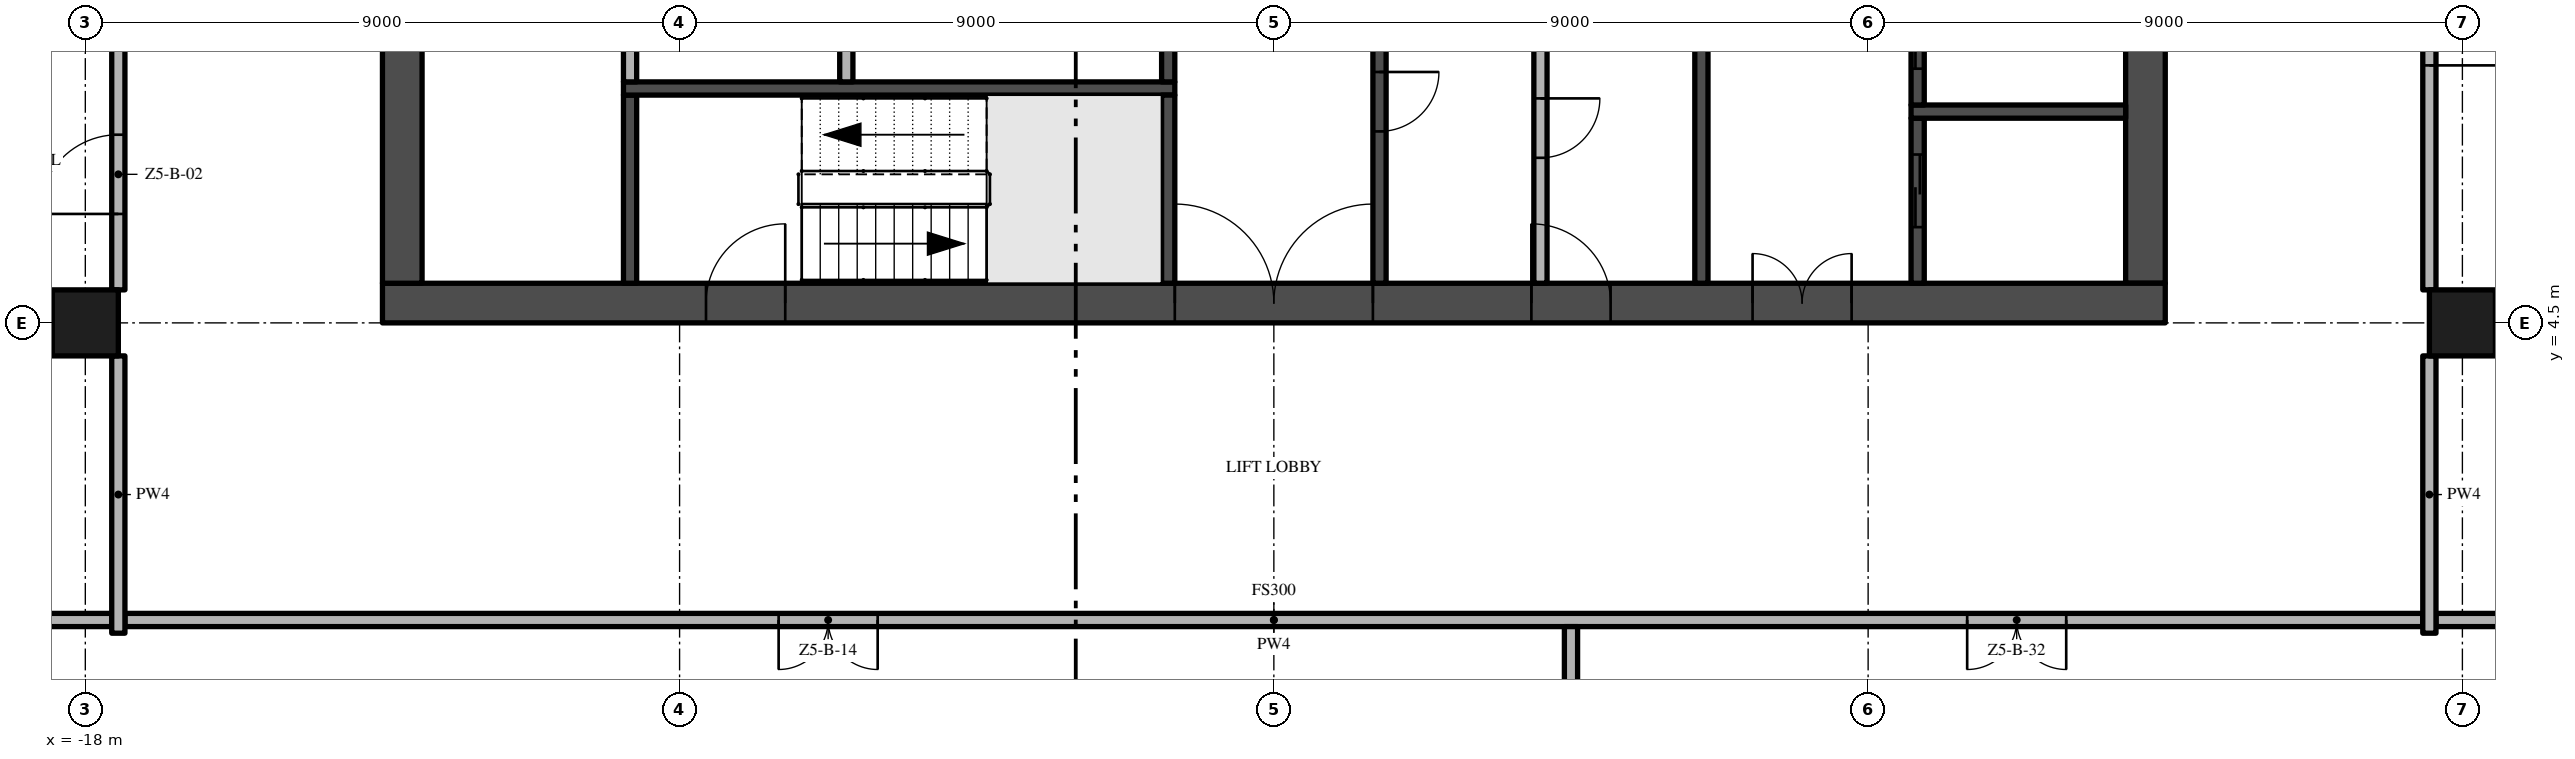
"""IFC4 building model, lengths in metres.
Left out: names, types, materials, properties, quantities, classifications, styles, units other than length and angle.
Written with IfcOpenShell. Run it as: python <this file> out.ifc"""

import sys

from ifc_helpers import new_model, si_unit, direction, frame, frame_2d, origin, origin_2d, place, context, subcontext, project, spatial, rectangle, extrude, element, fill, save


model = new_model("IFC4")
c1 = context("Model", 3, precision=1e-05, world=origin(), true_north=direction((0.0, 1.0)))
c2 = subcontext(c1, "Body", "Model", "MODEL_VIEW")
j1 = project(units=[si_unit("LENGTHUNIT", "METRE"), si_unit("PLANEANGLEUNIT", "RADIAN")], contexts=[c1])
p1 = place(None, origin())
s1 = spatial("IfcSite", under=j1, at=p1, CompositionType="ELEMENT")
p2 = place(p1, origin())
s2 = spatial("IfcBuilding", under=s1, at=p2, CompositionType="ELEMENT")
p3 = place(p2, frame((0.0, 0.0, 250.2)))
s3 = spatial("IfcBuildingStorey", under=s2, at=p3, CompositionType="ELEMENT", Elevation=250.2)
p4 = place(p3, frame((-13.5, 4.8, -0.3), z_axis=(0.0, 0.0, 1.0), x_axis=(1.0, 0.0, 0.0)))
e1 = element("IfcWall", 1, at=p4, inside=s3, PredefinedType="SHEAR", context=c2, shape_type="SweptSolid", body=[
    extrude(rectangle(XDim=27.0, YDim=0.6, at=frame_2d((13.5, 0.0))), origin(), (0.0, 0.0, 1.0), 3.8),
])
p5 = place(p4, frame((12.0, 0.0, 0.3)))
e2 = element("IfcOpeningElement", 2, at=p5, cuts=e1, PredefinedType="OPENING", context=c2, shape_type="SweptSolid", body=[
    extrude(rectangle(XDim=3.0, YDim=2.4, at=frame_2d((1.5, 1.2))), frame((0.0, 0.31, 0.0), z_axis=(0.0, -1.0, 0.0), x_axis=(1.0, 0.0, 0.0)), (0.0, 0.0, 1.0), 0.62),
])
p6 = place(p4, frame((4.9, 0.0, 0.3)))
e3 = element("IfcOpeningElement", 3, at=p6, cuts=e1, PredefinedType="OPENING", context=c2, shape_type="SweptSolid", body=[
    extrude(rectangle(XDim=1.2, YDim=2.2, at=frame_2d((0.6, 1.1))), frame((0.0, 0.31, 0.0), z_axis=(0.0, -1.0, 0.0), x_axis=(1.0, 0.0, 0.0)), (0.0, 0.0, 1.0), 0.62),
])
p7 = place(p4, frame((20.75, 0.0, 0.3)))
e4 = element("IfcOpeningElement", 4, at=p7, cuts=e1, PredefinedType="OPENING", context=c2, shape_type="SweptSolid", body=[
    extrude(rectangle(XDim=1.5, YDim=2.2, at=frame_2d((0.75, 1.1))), frame((0.0, 0.31, 0.0), z_axis=(0.0, -1.0, 0.0), x_axis=(1.0, 0.0, 0.0)), (0.0, 0.0, 1.0), 0.62),
])
p8 = place(p4, frame((17.4, 0.0, 0.3)))
e5 = element("IfcOpeningElement", 5, at=p8, cuts=e1, PredefinedType="OPENING", context=c2, shape_type="SweptSolid", body=[
    extrude(rectangle(XDim=1.2, YDim=2.2, at=frame_2d((0.6, 1.1))), frame((0.0, 0.31, 0.0), z_axis=(0.0, -1.0, 0.0), x_axis=(1.0, 0.0, 0.0)), (0.0, 0.0, 1.0), 0.62),
])
p9 = place(p3, frame((13.2, 5.1, -0.3), z_axis=(0.0, 0.0, 1.0), x_axis=(0.0, 1.0, 0.0)))
e6 = element("IfcWall", 6, at=p9, inside=s3, PredefinedType="SHEAR", context=c2, shape_type="SweptSolid", body=[
    extrude(rectangle(XDim=16.8, YDim=0.6, at=frame_2d((8.4, 0.0))), origin(), (0.0, 0.0, 1.0), 3.8),
])
p10 = place(p9, frame((6.3, 0.0, 0.3)))
e7 = element("IfcOpeningElement", 7, at=p10, cuts=e6, PredefinedType="OPENING", context=c2, shape_type="SweptSolid", body=[
    extrude(rectangle(XDim=1.2, YDim=2.2, at=frame_2d((0.6, 1.1))), frame((0.0, 0.31, 0.0), z_axis=(0.0, -1.0, 0.0), x_axis=(1.0, 0.0, 0.0)), (0.0, 0.0, 1.0), 0.62),
])
p11 = place(p3, frame((-13.2, 21.9, -0.3), z_axis=(0.0, 0.0, 1.0), x_axis=(0.0, -1.0, 0.0)))
e8 = element("IfcWall", 8, at=p11, inside=s3, PredefinedType="SHEAR", context=c2, shape_type="SweptSolid", body=[
    extrude(rectangle(XDim=16.8, YDim=0.6, at=frame_2d((8.4, 0.0))), origin(), (0.0, 0.0, 1.0), 3.8),
])
p12 = place(p11, frame((9.3, 0.0, 0.3)))
e9 = element("IfcOpeningElement", 9, at=p12, cuts=e8, PredefinedType="OPENING", context=c2, shape_type="SweptSolid", body=[
    extrude(rectangle(XDim=1.2, YDim=2.2, at=frame_2d((0.6, 1.1))), frame((0.0, 0.31, 0.0), z_axis=(0.0, -1.0, 0.0), x_axis=(1.0, 0.0, 0.0)), (0.0, 0.0, 1.0), 0.62),
])
for number, where, z_axis, x_axis in (
    (10, (-18.0, 4.5, 0.0), (0.0, 0.0, 1.0), (1.0, 0.0, 0.0)),
    (11, (18.0, 4.5, 0.0), (0.0, 0.0, 1.0), (1.0, 0.0, 0.0)),
):
    element("IfcColumn", number, at=place(p3, frame(where, z_axis=z_axis, x_axis=x_axis)), inside=s3, PredefinedType="COLUMN", context=c2, shape_type="SweptSolid", body=[
        extrude(rectangle(XDim=1.0, YDim=1.0, at=origin_2d()), origin(), (0.0, 0.0, 1.0), 3.5),
    ])
p13 = place(p3, frame((-9.75, 5.1, 0.0), z_axis=(0.0, 0.0, 1.0), x_axis=(0.0, 1.0, 0.0)))
e12 = element("IfcWall", 12, at=p13, inside=s3, PredefinedType="SHEAR", context=c2, shape_type="SweptSolid", body=[
    extrude(rectangle(XDim=2.85, YDim=0.2, at=frame_2d((1.425, 0.0))), origin(), (0.0, 0.0, 1.0), 3.5),
])
p14 = place(p3, frame((-9.85, 8.05, 0.0), z_axis=(0.0, 0.0, 1.0), x_axis=(1.0, 0.0, 0.0)))
e13 = element("IfcWall", 13, at=p14, inside=s3, PredefinedType="SHEAR", context=c2, shape_type="SweptSolid", body=[
    extrude(rectangle(XDim=8.35, YDim=0.2, at=frame_2d((4.175, 0.0))), origin(), (0.0, 0.0, 1.0), 3.5),
])
p15 = place(p3, frame((-9.75, 8.15, 0.0), z_axis=(0.0, 0.0, 1.0), x_axis=(0.0, 1.0, 0.0)))
e14 = element("IfcWall", 14, at=p15, inside=s3, PredefinedType="PARTITIONING", context=c2, shape_type="SweptSolid", body=[
    extrude(rectangle(XDim=1.85, YDim=0.2, at=frame_2d((0.925, 0.0))), origin(), (0.0, 0.0, 1.0), 3.5),
])
p16 = place(p15, frame((0.475, 0.0, 0.0)))
e15 = element("IfcOpeningElement", 15, at=p16, cuts=e14, PredefinedType="OPENING", context=c2, shape_type="SweptSolid", body=[
    extrude(rectangle(XDim=0.9, YDim=2.1, at=frame_2d((0.45, 1.05))), frame((0.0, 0.11, 0.0), z_axis=(0.0, -1.0, 0.0), x_axis=(1.0, 0.0, 0.0)), (0.0, 0.0, 1.0), 0.22),
])
p17 = place(p3, frame((-6.475, 8.15, 0.0), z_axis=(0.0, 0.0, 1.0), x_axis=(0.0, 1.0, 0.0)))
e16 = element("IfcWall", 16, at=p17, inside=s3, PredefinedType="PARTITIONING", context=c2, shape_type="SweptSolid", body=[
    extrude(rectangle(XDim=5.35, YDim=0.2, at=frame_2d((2.675, 0.0))), origin(), (0.0, 0.0, 1.0), 3.5),
])
p18 = place(p3, frame((-1.6, 5.1, 0.0), z_axis=(0.0, 0.0, 1.0), x_axis=(0.0, 1.0, 0.0)))
e17 = element("IfcWall", 17, at=p18, inside=s3, PredefinedType="SHEAR", context=c2, shape_type="SweptSolid", body=[
    extrude(rectangle(XDim=2.85, YDim=0.2, at=frame_2d((1.425, 0.0))), origin(), (0.0, 0.0, 1.0), 3.5),
])
p19 = place(p3, frame((-1.6, 8.15, 0.0), z_axis=(0.0, 0.0, 1.0), x_axis=(0.0, 1.0, 0.0)))
e18 = element("IfcWall", 18, at=p19, inside=s3, PredefinedType="SHEAR", context=c2, shape_type="SweptSolid", body=[
    extrude(rectangle(XDim=5.35, YDim=0.2, at=frame_2d((2.675, 0.0))), origin(), (0.0, 0.0, 1.0), 3.5),
])
p20 = place(p19, frame((2.225, 0.0, 0.0)))
e19 = element("IfcOpeningElement", 19, at=p20, cuts=e18, PredefinedType="OPENING", context=c2, shape_type="SweptSolid", body=[
    extrude(rectangle(XDim=0.9, YDim=2.1, at=frame_2d((0.45, 1.05))), frame((0.0, 0.11, 0.0), z_axis=(0.0, -1.0, 0.0), x_axis=(1.0, 0.0, 0.0)), (0.0, 0.0, 1.0), 0.22),
])
p21 = place(p3, frame((1.6, 9.8, 0.0), z_axis=(0.0, 0.0, 1.0), x_axis=(0.0, -1.0, 0.0)))
e20 = element("IfcWall", 20, at=p21, inside=s3, PredefinedType="SHEAR", context=c2, shape_type="SweptSolid", body=[
    extrude(rectangle(XDim=4.7, YDim=0.2, at=frame_2d((2.35, 0.0))), origin(), (0.0, 0.0, 1.0), 3.5),
])
p22 = place(p21, frame((1.5, 0.0, 0.0)))
e21 = element("IfcOpeningElement", 21, at=p22, cuts=e20, PredefinedType="OPENING", context=c2, shape_type="SweptSolid", body=[
    extrude(rectangle(XDim=0.9, YDim=2.1, at=frame_2d((0.45, 1.05))), frame((0.0, 0.11, 0.0), z_axis=(0.0, -1.0, 0.0), x_axis=(1.0, 0.0, 0.0)), (0.0, 0.0, 1.0), 0.22),
])
p23 = place(p3, frame((4.037, 9.8, 0.0), z_axis=(0.0, 0.0, 1.0), x_axis=(0.0, -1.0, 0.0)))
e22 = element("IfcWall", 22, at=p23, inside=s3, PredefinedType="PARTITIONING", context=c2, shape_type="SweptSolid", body=[
    extrude(rectangle(XDim=4.7, YDim=0.2, at=frame_2d((2.35, 0.0))), origin(), (0.0, 0.0, 1.0), 3.5),
])
p24 = place(p23, frame((1.9, 0.0, 0.0)))
e23 = element("IfcOpeningElement", 23, at=p24, cuts=e22, PredefinedType="OPENING", context=c2, shape_type="SweptSolid", body=[
    extrude(rectangle(XDim=0.9, YDim=2.1, at=frame_2d((0.45, 1.05))), frame((0.0, 0.11, 0.0), z_axis=(0.0, -1.0, 0.0), x_axis=(1.0, 0.0, 0.0)), (0.0, 0.0, 1.0), 0.22),
])
p25 = place(p3, frame((6.475, 5.1, 0.0), z_axis=(0.0, 0.0, 1.0), x_axis=(0.0, 1.0, 0.0)))
e24 = element("IfcWall", 24, at=p25, inside=s3, PredefinedType="SHEAR", context=c2, shape_type="SweptSolid", body=[
    extrude(rectangle(XDim=4.7, YDim=0.2, at=frame_2d((2.35, 0.0))), origin(), (0.0, 0.0, 1.0), 3.5),
])
p26 = place(p3, frame((9.75, 5.1, 0.0), z_axis=(0.0, 0.0, 1.0), x_axis=(0.0, 1.0, 0.0)))
e25 = element("IfcWall", 25, at=p26, inside=s3, PredefinedType="SHEAR", context=c2, shape_type="SweptSolid", body=[
    extrude(rectangle(XDim=2.5, YDim=0.2, at=frame_2d((1.25, 0.0))), origin(), (0.0, 0.0, 1.0), 3.5),
])
p27 = place(p26, frame((0.85, 0.0, 0.0)))
e26 = element("IfcOpeningElement", 26, at=p27, cuts=e25, PredefinedType="OPENING", context=c2, shape_type="SweptSolid", body=[
    extrude(rectangle(XDim=1.1, YDim=2.1, at=frame_2d((0.55, 1.05))), frame((0.0, 0.11, 0.0), z_axis=(0.0, -1.0, 0.0), x_axis=(1.0, 0.0, 0.0)), (0.0, 0.0, 1.0), 0.22),
])
p28 = place(p3, frame((9.65, 7.7, 0.0), z_axis=(0.0, 0.0, 1.0), x_axis=(1.0, 0.0, 0.0)))
e27 = element("IfcWall", 27, at=p28, inside=s3, PredefinedType="SHEAR", context=c2, shape_type="SweptSolid", body=[
    extrude(rectangle(XDim=3.25, YDim=0.2, at=frame_2d((1.625, 0.0))), origin(), (0.0, 0.0, 1.0), 3.5),
])
p29 = place(p3, frame((9.75, 7.8, 0.0), z_axis=(0.0, 0.0, 1.0), x_axis=(0.0, 1.0, 0.0)))
e28 = element("IfcWall", 28, at=p29, inside=s3, PredefinedType="SHEAR", context=c2, shape_type="SweptSolid", body=[
    extrude(rectangle(XDim=2.2, YDim=0.2, at=frame_2d((1.1, 0.0))), origin(), (0.0, 0.0, 1.0), 3.5),
])
p30 = place(p29, frame((0.55, 0.0, 0.0)))
e29 = element("IfcOpeningElement", 29, at=p30, cuts=e28, PredefinedType="OPENING", context=c2, shape_type="SweptSolid", body=[
    extrude(rectangle(XDim=1.1, YDim=2.1, at=frame_2d((0.55, 1.05))), frame((0.0, 0.11, 0.0), z_axis=(0.0, -1.0, 0.0), x_axis=(1.0, 0.0, 0.0)), (0.0, 0.0, 1.0), 0.22),
])
p31 = place(p3, frame((17.4, 0.0, 0.0), z_axis=(0.0, 0.0, 1.0), x_axis=(-1.0, 0.0, 0.0)))
e30 = element("IfcWall", 30, at=p31, inside=s3, PredefinedType="PARTITIONING", context=c2, shape_type="SweptSolid", body=[
    extrude(rectangle(XDim=34.8, YDim=0.2, at=frame_2d((17.4, 0.0))), origin(), (0.0, 0.0, 1.0), 3.5),
])
p32 = place(p31, frame((23.4, 0.0, 0.0)))
e31 = element("IfcOpeningElement", 31, at=p32, cuts=e30, PredefinedType="OPENING", context=c2, shape_type="SweptSolid", body=[
    extrude(rectangle(XDim=1.5, YDim=2.4, at=frame_2d((0.75, 1.2))), frame((0.0, 0.11, 0.0), z_axis=(0.0, -1.0, 0.0), x_axis=(1.0, 0.0, 0.0)), (0.0, 0.0, 1.0), 0.22),
])
p33 = place(p31, frame((5.4, 0.0, 0.0)))
e32 = element("IfcOpeningElement", 32, at=p33, cuts=e30, PredefinedType="OPENING", context=c2, shape_type="SweptSolid", body=[
    extrude(rectangle(XDim=1.5, YDim=2.4, at=frame_2d((0.75, 1.2))), frame((0.0, 0.11, 0.0), z_axis=(0.0, -1.0, 0.0), x_axis=(1.0, 0.0, 0.0)), (0.0, 0.0, 1.0), 0.22),
])
for number, where, z_axis, x_axis in (
    (33, (-26.7, 0.0, 0.0), (0.0, 0.0, 1.0), (1.0, 0.0, 0.0)),
    (34, (17.6, 0.0, 0.0), (0.0, 0.0, 1.0), (1.0, 0.0, 0.0)),
):
    element("IfcWall", number, at=place(p3, frame(where, z_axis=z_axis, x_axis=x_axis)), inside=s3, PredefinedType="PARTITIONING", context=c2, shape_type="SweptSolid", body=[
        extrude(rectangle(XDim=9.1, YDim=0.2, at=frame_2d((4.55, 0.0))), origin(), (0.0, 0.0, 1.0), 3.5),
    ])
p34 = place(p3, frame((-17.5, -0.2, 0.0), z_axis=(0.0, 0.0, 1.0), x_axis=(0.0, 1.0, 0.0)))
e35 = element("IfcWall", 35, at=p34, inside=s3, PredefinedType="PARTITIONING", context=c2, shape_type="SweptSolid", body=[
    extrude(rectangle(XDim=4.2, YDim=0.2, at=frame_2d((2.1, 0.0))), origin(), (0.0, 0.0, 1.0), 3.5),
])
p35 = place(p3, frame((-17.5, 5.0, 0.0), z_axis=(0.0, 0.0, 1.0), x_axis=(0.0, 1.0, 0.0)))
e36 = element("IfcWall", 36, at=p35, inside=s3, PredefinedType="PARTITIONING", context=c2, shape_type="SweptSolid", body=[
    extrude(rectangle(XDim=8.0, YDim=0.2, at=frame_2d((4.0, 0.0))), origin(), (0.0, 0.0, 1.0), 3.5),
])
p36 = place(p35, frame((1.15, 0.0, 0.0)))
e37 = element("IfcOpeningElement", 37, at=p36, cuts=e36, PredefinedType="OPENING", context=c2, shape_type="SweptSolid", body=[
    extrude(rectangle(XDim=1.2, YDim=2.4, at=frame_2d((0.6, 1.2))), frame((0.0, 0.11, 0.0), z_axis=(0.0, -1.0, 0.0), x_axis=(1.0, 0.0, 0.0)), (0.0, 0.0, 1.0), 0.22),
])
p37 = place(p3, frame((4.5, -22.2, 0.0), z_axis=(0.0, 0.0, 1.0), x_axis=(0.0, 1.0, 0.0)))
e38 = element("IfcWall", 38, at=p37, inside=s3, PredefinedType="PARTITIONING", context=c2, shape_type="SweptSolid", body=[
    extrude(rectangle(XDim=22.1, YDim=0.2, at=frame_2d((11.05, 0.0))), origin(), (0.0, 0.0, 1.0), 3.5),
])
p38 = place(p3, frame((17.5, -0.2, 0.0), z_axis=(0.0, 0.0, 1.0), x_axis=(0.0, 1.0, 0.0)))
e39 = element("IfcWall", 39, at=p38, inside=s3, PredefinedType="PARTITIONING", context=c2, shape_type="SweptSolid", body=[
    extrude(rectangle(XDim=4.2, YDim=0.2, at=frame_2d((2.1, 0.0))), origin(), (0.0, 0.0, 1.0), 3.5),
])
p39 = place(p3, frame((17.5, 13.0, 0.0), z_axis=(0.0, 0.0, 1.0), x_axis=(0.0, -1.0, 0.0)))
e40 = element("IfcWall", 40, at=p39, inside=s3, PredefinedType="PARTITIONING", context=c2, shape_type="SweptSolid", body=[
    extrude(rectangle(XDim=8.0, YDim=0.2, at=frame_2d((4.0, 0.0))), origin(), (0.0, 0.0, 1.0), 3.5),
])
p40 = place(p39, frame((3.4, 0.0, 0.0)))
e41 = element("IfcOpeningElement", 41, at=p40, cuts=e40, PredefinedType="OPENING", context=c2, shape_type="SweptSolid", body=[
    extrude(rectangle(XDim=1.2, YDim=2.4, at=frame_2d((0.6, 1.2))), frame((0.0, 0.11, 0.0), z_axis=(0.0, -1.0, 0.0), x_axis=(1.0, 0.0, 0.0)), (0.0, 0.0, 1.0), 0.22),
])
p41 = place(p5, frame((3.0, 0.0, 0.0), z_axis=(0.0, 0.0, 1.0), x_axis=(-1.0, 0.0, 0.0)))
e42 = element("IfcDoor", 42, at=p41, inside=s3, OperationType="DOUBLE_DOOR_SINGLE_SWING", PredefinedType="DOOR", context=c2, shape_type="SweptSolid", body=[
    extrude(rectangle(XDim=3.0, YDim=2.4, at=frame_2d((1.5, 1.2))), frame((0.0, 0.025, 0.0), z_axis=(0.0, -1.0, 0.0), x_axis=(1.0, 0.0, 0.0)), (0.0, 0.0, 1.0), 0.05),
])
fill(e2, e42)
p42 = place(p6, frame((1.2, 0.0, 0.0), z_axis=(0.0, 0.0, 1.0), x_axis=(-1.0, 0.0, 0.0)))
e43 = element("IfcDoor", 43, at=p42, inside=s3, OperationType="SINGLE_SWING_LEFT", PredefinedType="DOOR", context=c2, shape_type="SweptSolid", body=[
    extrude(rectangle(XDim=1.2, YDim=2.2, at=frame_2d((0.6, 1.1))), frame((0.0, 0.025, 0.0), z_axis=(0.0, -1.0, 0.0), x_axis=(1.0, 0.0, 0.0)), (0.0, 0.0, 1.0), 0.05),
])
fill(e3, e43)
p43 = place(p7, frame((1.5, 0.0, 0.0), z_axis=(0.0, 0.0, 1.0), x_axis=(-1.0, 0.0, 0.0)))
e44 = element("IfcDoor", 44, at=p43, inside=s3, OperationType="DOUBLE_DOOR_SINGLE_SWING", PredefinedType="DOOR", context=c2, shape_type="SweptSolid", body=[
    extrude(rectangle(XDim=1.5, YDim=2.2, at=frame_2d((0.75, 1.1))), frame((0.0, 0.025, 0.0), z_axis=(0.0, -1.0, 0.0), x_axis=(1.0, 0.0, 0.0)), (0.0, 0.0, 1.0), 0.05),
])
fill(e4, e44)
p44 = place(p8, frame((1.2, 0.0, 0.0), z_axis=(0.0, 0.0, 1.0), x_axis=(-1.0, 0.0, 0.0)))
e45 = element("IfcDoor", 45, at=p44, inside=s3, OperationType="SINGLE_SWING_RIGHT", PredefinedType="DOOR", context=c2, shape_type="SweptSolid", body=[
    extrude(rectangle(XDim=1.2, YDim=2.2, at=frame_2d((0.6, 1.1))), frame((0.0, 0.025, 0.0), z_axis=(0.0, -1.0, 0.0), x_axis=(1.0, 0.0, 0.0)), (0.0, 0.0, 1.0), 0.05),
])
fill(e5, e45)
p45 = place(p27, origin())
e46 = element("IfcDoor", 46, at=p45, inside=s3, OperationType="SLIDING_TO_RIGHT", PredefinedType="DOOR", context=c2, shape_type="SweptSolid", body=[
    extrude(rectangle(XDim=1.1, YDim=2.1, at=frame_2d((0.55, 1.05))), frame((0.0, 0.025, 0.0), z_axis=(0.0, -1.0, 0.0), x_axis=(1.0, 0.0, 0.0)), (0.0, 0.0, 1.0), 0.05),
])
fill(e26, e46)
p46 = place(p30, origin())
e47 = element("IfcDoor", 47, at=p46, inside=s3, OperationType="SLIDING_TO_RIGHT", PredefinedType="DOOR", context=c2, shape_type="SweptSolid", body=[
    extrude(rectangle(XDim=1.1, YDim=2.1, at=frame_2d((0.55, 1.05))), frame((0.0, 0.025, 0.0), z_axis=(0.0, -1.0, 0.0), x_axis=(1.0, 0.0, 0.0)), (0.0, 0.0, 1.0), 0.05),
])
fill(e29, e47)
p47 = place(p22, origin())
e48 = element("IfcDoor", 48, at=p47, inside=s3, OperationType="SINGLE_SWING_LEFT", PredefinedType="DOOR", context=c2, shape_type="SweptSolid", body=[
    extrude(rectangle(XDim=0.9, YDim=2.1, at=frame_2d((0.45, 1.05))), frame((0.0, 0.025, 0.0), z_axis=(0.0, -1.0, 0.0), x_axis=(1.0, 0.0, 0.0)), (0.0, 0.0, 1.0), 0.05),
])
fill(e21, e48)
p48 = place(p24, origin())
e49 = element("IfcDoor", 49, at=p48, inside=s3, OperationType="SINGLE_SWING_LEFT", PredefinedType="DOOR", context=c2, shape_type="SweptSolid", body=[
    extrude(rectangle(XDim=0.9, YDim=2.1, at=frame_2d((0.45, 1.05))), frame((0.0, 0.025, 0.0), z_axis=(0.0, -1.0, 0.0), x_axis=(1.0, 0.0, 0.0)), (0.0, 0.0, 1.0), 0.05),
])
fill(e23, e49)
p49 = place(p36, origin())
e50 = element("IfcDoor", 50, at=p49, inside=s3, OperationType="SINGLE_SWING_LEFT", PredefinedType="DOOR", context=c2, shape_type="SweptSolid", body=[
    extrude(rectangle(XDim=1.2, YDim=2.4, at=frame_2d((0.6, 1.2))), frame((0.0, 0.025, 0.0), z_axis=(0.0, -1.0, 0.0), x_axis=(1.0, 0.0, 0.0)), (0.0, 0.0, 1.0), 0.05),
])
fill(e37, e50)
p50 = place(p40, origin())
e51 = element("IfcDoor", 51, at=p50, inside=s3, OperationType="SINGLE_SWING_RIGHT", PredefinedType="DOOR", context=c2, shape_type="SweptSolid", body=[
    extrude(rectangle(XDim=1.2, YDim=2.4, at=frame_2d((0.6, 1.2))), frame((0.0, 0.025, 0.0), z_axis=(0.0, -1.0, 0.0), x_axis=(1.0, 0.0, 0.0)), (0.0, 0.0, 1.0), 0.05),
])
fill(e41, e51)
p51 = place(p32, origin())
e52 = element("IfcDoor", 52, at=p51, inside=s3, OperationType="DOUBLE_DOOR_SINGLE_SWING", PredefinedType="DOOR", context=c2, shape_type="SweptSolid", body=[
    extrude(rectangle(XDim=1.5, YDim=2.4, at=frame_2d((0.75, 1.2))), frame((0.0, 0.025, 0.0), z_axis=(0.0, -1.0, 0.0), x_axis=(1.0, 0.0, 0.0)), (0.0, 0.0, 1.0), 0.05),
])
fill(e31, e52)
p52 = place(p33, origin())
e53 = element("IfcDoor", 53, at=p52, inside=s3, OperationType="DOUBLE_DOOR_SINGLE_SWING", PredefinedType="DOOR", context=c2, shape_type="SweptSolid", body=[
    extrude(rectangle(XDim=1.5, YDim=2.4, at=frame_2d((0.75, 1.2))), frame((0.0, 0.025, 0.0), z_axis=(0.0, -1.0, 0.0), x_axis=(1.0, 0.0, 0.0)), (0.0, 0.0, 1.0), 0.05),
])
fill(e32, e53)
save(model, sys.argv[1])
